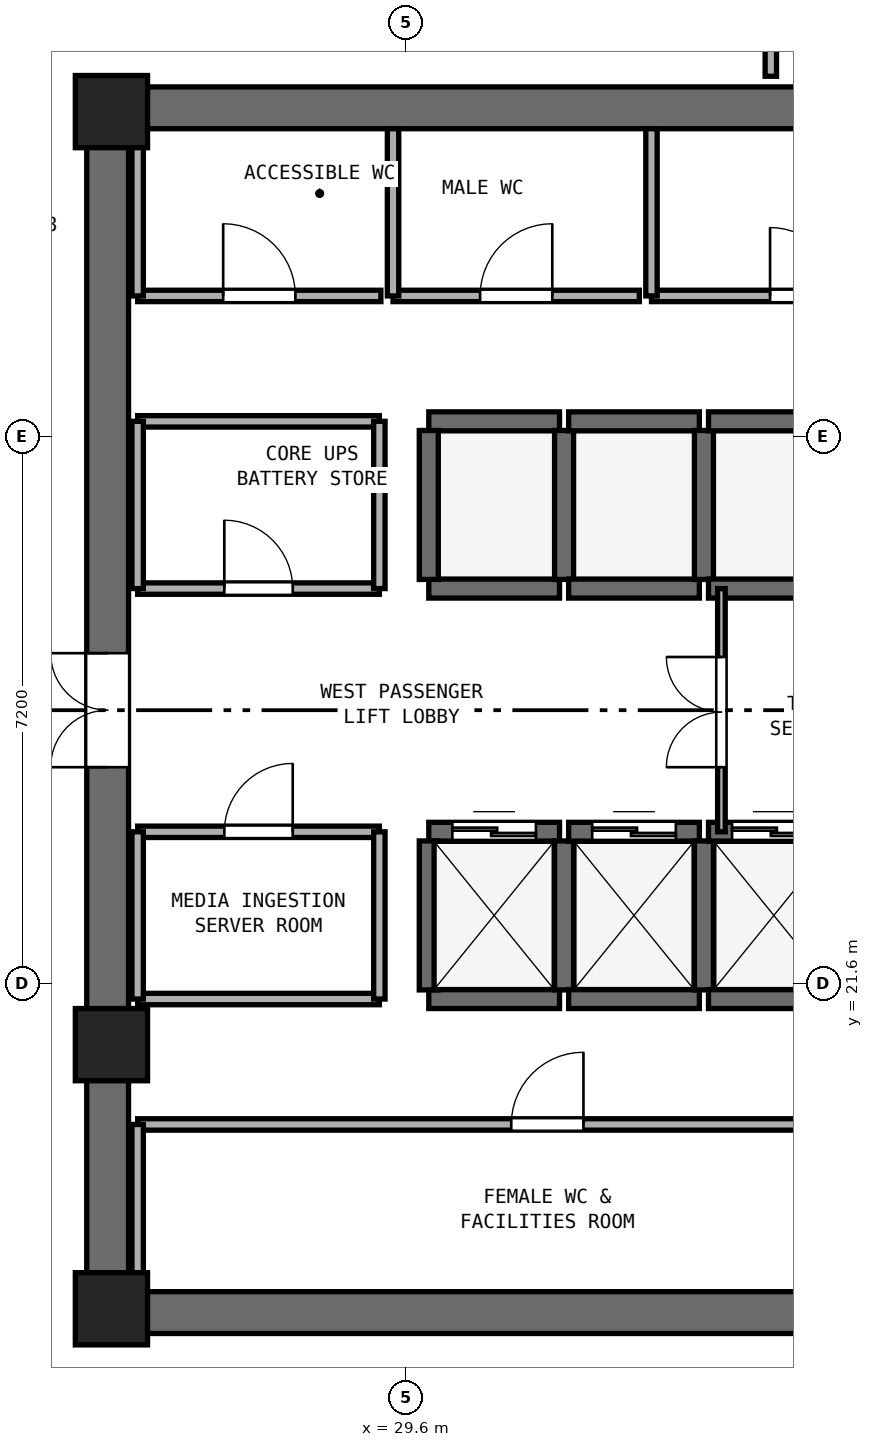
"""IFC4 building model, lengths in metres.
Left out: names, types, materials, properties, quantities, classifications, styles, units other than length and angle.
Written with IfcOpenShell. Run it as: python <this file> out.ifc"""

import sys

from ifc_helpers import new_model, si_unit, direction, frame, frame_2d, origin, origin_2d, place, context, subcontext, project, spatial, rectangle, extrude, element, fill, save


model = new_model("IFC4")
c1 = context("Model", 3, precision=1e-05, world=origin(), true_north=direction((0.0, 1.0)))
c2 = subcontext(c1, "Body", "Model", "MODEL_VIEW")
j1 = project(units=[si_unit("LENGTHUNIT", "METRE"), si_unit("PLANEANGLEUNIT", "RADIAN")], contexts=[c1])
p1 = place(None, origin())
s1 = spatial("IfcSite", under=j1, at=p1, CompositionType="ELEMENT")
p2 = place(p1, origin())
s2 = spatial("IfcBuilding", under=s1, at=p2, CompositionType="ELEMENT")
p3 = place(p2, frame((0.0, 0.0, 197.2)))
s3 = spatial("IfcBuildingStorey", under=s2, at=p3, CompositionType="ELEMENT", Elevation=197.2)
for number, where, z_axis, x_axis in (
    (1, (25.4, 17.275, 0.0), (0.0, 0.0, 1.0), (1.0, 0.0, 0.0)),
    (2, (25.4, 33.125, 0.0), (0.0, 0.0, 1.0), (1.0, 0.0, 0.0)),
):
    element("IfcWall", number, at=place(p3, frame(where, z_axis=z_axis, x_axis=x_axis)), inside=s3, PredefinedType="SHEAR", context=c2, shape_type="SweptSolid", body=[
        extrude(rectangle(XDim=23.2, YDim=0.55, at=frame_2d((11.6, 0.0))), origin(), (0.0, 0.0, 1.0), 3.54),
    ])
p4 = place(p3, frame((25.675, 17.55, 0.0), z_axis=(0.0, 0.0, 1.0), x_axis=(0.0, 1.0, 0.0)))
e3 = element("IfcWall", 3, at=p4, inside=s3, PredefinedType="SHEAR", context=c2, shape_type="SweptSolid", body=[
    extrude(rectangle(XDim=15.3, YDim=0.55, at=frame_2d((7.65, 0.0))), origin(), (0.0, 0.0, 1.0), 3.54),
])
p5 = place(p4, frame((6.9, 0.0, 0.0)))
e4 = element("IfcOpeningElement", 4, at=p5, cuts=e3, PredefinedType="OPENING", context=c2, shape_type="SweptSolid", body=[
    extrude(rectangle(XDim=1.5, YDim=2.15, at=frame_2d((0.75, 1.075))), frame((0.0, 0.285, 0.0), z_axis=(0.0, -1.0, 0.0), x_axis=(1.0, 0.0, 0.0)), (0.0, 0.0, 1.0), 0.57),
])
for number, where, z_axis, x_axis in (
    (5, (25.725, 17.325, 0.0), (0.0, 0.0, 1.0), (1.0, 0.0, 0.0)),
    (6, (25.725, 33.075, 0.0), (0.0, 0.0, 1.0), (1.0, 0.0, 0.0)),
    (7, (25.725, 20.8, 0.0), (0.0, 0.0, 1.0), (1.0, 0.0, 0.0)),
):
    element("IfcColumn", number, at=place(p3, frame(where, z_axis=z_axis, x_axis=x_axis)), inside=s3, PredefinedType="PILASTER", context=c2, shape_type="SweptSolid", body=[
        extrude(rectangle(XDim=0.95, YDim=0.95, at=origin_2d()), origin(), (0.0, 0.0, 1.0), 3.8),
    ])
p6 = place(p3, frame((29.9, 21.4, 0.0), z_axis=(0.0, 0.0, 1.0), x_axis=(1.0, 0.0, 0.0)))
e8 = element("IfcWall", 8, at=p6, inside=s3, PredefinedType="SHEAR", context=c2, shape_type="SweptSolid", body=[
    extrude(rectangle(XDim=1.72, YDim=0.25, at=frame_2d((0.86, 0.0))), origin(), (0.0, 0.0, 1.0), 3.54),
])
p7 = place(p3, frame((29.9, 23.6, 0.0), z_axis=(0.0, 0.0, 1.0), x_axis=(1.0, 0.0, 0.0)))
e9 = element("IfcWall", 9, at=p7, inside=s3, PredefinedType="SHEAR", context=c2, shape_type="SweptSolid", body=[
    extrude(rectangle(XDim=1.72, YDim=0.25, at=frame_2d((0.86, 0.0))), origin(), (0.0, 0.0, 1.0), 3.54),
])
p8 = place(p7, frame((0.31, 0.0, 0.0)))
e10 = element("IfcOpeningElement", 10, at=p8, cuts=e9, PredefinedType="OPENING", context=c2, shape_type="SweptSolid", body=[
    extrude(rectangle(XDim=1.1, YDim=2.15, at=frame_2d((0.55, 1.075))), frame((0.0, 0.135, 0.0), z_axis=(0.0, -1.0, 0.0), x_axis=(1.0, 0.0, 0.0)), (0.0, 0.0, 1.0), 0.27),
])
for number, where, z_axis, x_axis in (
    (11, (29.9, 21.52, 0.0), (0.0, 0.0, 1.0), (0.0, 1.0, 0.0)),
    (12, (31.68, 21.52, 0.0), (0.0, 0.0, 1.0), (0.0, 1.0, 0.0)),
):
    element("IfcWall", number, at=place(p3, frame(where, z_axis=z_axis, x_axis=x_axis)), inside=s3, PredefinedType="SHEAR", context=c2, shape_type="SweptSolid", body=[
        extrude(rectangle(XDim=1.96, YDim=0.25, at=frame_2d((0.98, 0.0))), origin(), (0.0, 0.0, 1.0), 3.54),
    ])
p9 = place(p3, frame((31.74, 21.4, 0.0), z_axis=(0.0, 0.0, 1.0), x_axis=(1.0, 0.0, 0.0)))
e13 = element("IfcWall", 13, at=p9, inside=s3, PredefinedType="SHEAR", context=c2, shape_type="SweptSolid", body=[
    extrude(rectangle(XDim=1.72, YDim=0.25, at=frame_2d((0.86, 0.0))), origin(), (0.0, 0.0, 1.0), 3.54),
])
p10 = place(p3, frame((31.74, 23.6, 0.0), z_axis=(0.0, 0.0, 1.0), x_axis=(1.0, 0.0, 0.0)))
e14 = element("IfcWall", 14, at=p10, inside=s3, PredefinedType="SHEAR", context=c2, shape_type="SweptSolid", body=[
    extrude(rectangle(XDim=1.72, YDim=0.25, at=frame_2d((0.86, 0.0))), origin(), (0.0, 0.0, 1.0), 3.54),
])
p11 = place(p10, frame((0.31, 0.0, 0.0)))
e15 = element("IfcOpeningElement", 15, at=p11, cuts=e14, PredefinedType="OPENING", context=c2, shape_type="SweptSolid", body=[
    extrude(rectangle(XDim=1.1, YDim=2.15, at=frame_2d((0.55, 1.075))), frame((0.0, 0.135, 0.0), z_axis=(0.0, -1.0, 0.0), x_axis=(1.0, 0.0, 0.0)), (0.0, 0.0, 1.0), 0.27),
])
p12 = place(p3, frame((33.52, 21.52, 0.0), z_axis=(0.0, 0.0, 1.0), x_axis=(0.0, 1.0, 0.0)))
e16 = element("IfcWall", 16, at=p12, inside=s3, PredefinedType="SHEAR", context=c2, shape_type="SweptSolid", body=[
    extrude(rectangle(XDim=1.96, YDim=0.25, at=frame_2d((0.98, 0.0))), origin(), (0.0, 0.0, 1.0), 3.54),
])
p13 = place(p3, frame((33.58, 21.4, 0.0), z_axis=(0.0, 0.0, 1.0), x_axis=(1.0, 0.0, 0.0)))
e17 = element("IfcWall", 17, at=p13, inside=s3, PredefinedType="SHEAR", context=c2, shape_type="SweptSolid", body=[
    extrude(rectangle(XDim=1.72, YDim=0.25, at=frame_2d((0.86, 0.0))), origin(), (0.0, 0.0, 1.0), 3.54),
])
p14 = place(p3, frame((33.58, 23.6, 0.0), z_axis=(0.0, 0.0, 1.0), x_axis=(1.0, 0.0, 0.0)))
e18 = element("IfcWall", 18, at=p14, inside=s3, PredefinedType="SHEAR", context=c2, shape_type="SweptSolid", body=[
    extrude(rectangle(XDim=1.72, YDim=0.25, at=frame_2d((0.86, 0.0))), origin(), (0.0, 0.0, 1.0), 3.54),
])
p15 = place(p14, frame((0.31, 0.0, 0.0)))
e19 = element("IfcOpeningElement", 19, at=p15, cuts=e18, PredefinedType="OPENING", context=c2, shape_type="SweptSolid", body=[
    extrude(rectangle(XDim=1.1, YDim=2.15, at=frame_2d((0.55, 1.075))), frame((0.0, 0.135, 0.0), z_axis=(0.0, -1.0, 0.0), x_axis=(1.0, 0.0, 0.0)), (0.0, 0.0, 1.0), 0.27),
])
for number, where, z_axis, x_axis in (
    (20, (29.9, 26.8, 0.0), (0.0, 0.0, 1.0), (1.0, 0.0, 0.0)),
    (21, (29.9, 29.0, 0.0), (0.0, 0.0, 1.0), (1.0, 0.0, 0.0)),
):
    element("IfcWall", number, at=place(p3, frame(where, z_axis=z_axis, x_axis=x_axis)), inside=s3, PredefinedType="SHEAR", context=c2, shape_type="SweptSolid", body=[
        extrude(rectangle(XDim=1.72, YDim=0.25, at=frame_2d((0.86, 0.0))), origin(), (0.0, 0.0, 1.0), 3.54),
    ])
for number, where, z_axis, x_axis in (
    (22, (29.9, 26.92, 0.0), (0.0, 0.0, 1.0), (0.0, 1.0, 0.0)),
    (23, (31.68, 26.92, 0.0), (0.0, 0.0, 1.0), (0.0, 1.0, 0.0)),
):
    element("IfcWall", number, at=place(p3, frame(where, z_axis=z_axis, x_axis=x_axis)), inside=s3, PredefinedType="SHEAR", context=c2, shape_type="SweptSolid", body=[
        extrude(rectangle(XDim=1.96, YDim=0.25, at=frame_2d((0.98, 0.0))), origin(), (0.0, 0.0, 1.0), 3.54),
    ])
for number, where, z_axis, x_axis in (
    (24, (31.74, 26.8, 0.0), (0.0, 0.0, 1.0), (1.0, 0.0, 0.0)),
    (25, (31.74, 29.0, 0.0), (0.0, 0.0, 1.0), (1.0, 0.0, 0.0)),
):
    element("IfcWall", number, at=place(p3, frame(where, z_axis=z_axis, x_axis=x_axis)), inside=s3, PredefinedType="SHEAR", context=c2, shape_type="SweptSolid", body=[
        extrude(rectangle(XDim=1.72, YDim=0.25, at=frame_2d((0.86, 0.0))), origin(), (0.0, 0.0, 1.0), 3.54),
    ])
p16 = place(p3, frame((33.52, 26.92, 0.0), z_axis=(0.0, 0.0, 1.0), x_axis=(0.0, 1.0, 0.0)))
e26 = element("IfcWall", 26, at=p16, inside=s3, PredefinedType="SHEAR", context=c2, shape_type="SweptSolid", body=[
    extrude(rectangle(XDim=1.96, YDim=0.25, at=frame_2d((0.98, 0.0))), origin(), (0.0, 0.0, 1.0), 3.54),
])
for number, where, z_axis, x_axis in (
    (27, (33.58, 26.8, 0.0), (0.0, 0.0, 1.0), (1.0, 0.0, 0.0)),
    (28, (33.58, 29.0, 0.0), (0.0, 0.0, 1.0), (1.0, 0.0, 0.0)),
):
    element("IfcWall", number, at=place(p3, frame(where, z_axis=z_axis, x_axis=x_axis)), inside=s3, PredefinedType="SHEAR", context=c2, shape_type="SweptSolid", body=[
        extrude(rectangle(XDim=1.72, YDim=0.25, at=frame_2d((0.86, 0.0))), origin(), (0.0, 0.0, 1.0), 3.54),
    ])
p17 = place(p3, frame((26.07, 30.65, 0.0), z_axis=(0.0, 0.0, 1.0), x_axis=(1.0, 0.0, 0.0)))
e29 = element("IfcWall", 29, at=p17, inside=s3, PredefinedType="PARTITIONING", context=c2, shape_type="SweptSolid", body=[
    extrude(rectangle(XDim=3.2, YDim=0.15, at=frame_2d((1.6, 0.0))), origin(), (0.0, 0.0, 1.0), 3.54),
])
p18 = place(p17, frame((1.125, 0.0, 0.0)))
e30 = element("IfcOpeningElement", 30, at=p18, cuts=e29, PredefinedType="OPENING", context=c2, shape_type="SweptSolid", body=[
    extrude(rectangle(XDim=0.95, YDim=2.1, at=frame_2d((0.475, 1.05))), frame((0.0, 0.085, 0.0), z_axis=(0.0, -1.0, 0.0), x_axis=(1.0, 0.0, 0.0)), (0.0, 0.0, 1.0), 0.17),
])
p19 = place(p3, frame((26.07, 30.65, 0.0), z_axis=(0.0, 0.0, 1.0), x_axis=(0.0, 1.0, 0.0)))
e31 = element("IfcWall", 31, at=p19, inside=s3, PredefinedType="PARTITIONING", context=c2, shape_type="SweptSolid", body=[
    extrude(rectangle(XDim=2.2, YDim=0.15, at=frame_2d((1.1, 0.0))), origin(), (0.0, 0.0, 1.0), 2.64),
])
p20 = place(p3, frame((29.43, 30.65, 0.0), z_axis=(0.0, 0.0, 1.0), x_axis=(1.0, 0.0, 0.0)))
e32 = element("IfcWall", 32, at=p20, inside=s3, PredefinedType="PARTITIONING", context=c2, shape_type="SweptSolid", body=[
    extrude(rectangle(XDim=3.24, YDim=0.15, at=frame_2d((1.62, 0.0))), origin(), (0.0, 0.0, 1.0), 3.54),
])
p21 = place(p20, frame((1.145, 0.0, 0.0)))
e33 = element("IfcOpeningElement", 33, at=p21, cuts=e32, PredefinedType="OPENING", context=c2, shape_type="SweptSolid", body=[
    extrude(rectangle(XDim=0.95, YDim=2.1, at=frame_2d((0.475, 1.05))), frame((0.0, 0.085, 0.0), z_axis=(0.0, -1.0, 0.0), x_axis=(1.0, 0.0, 0.0)), (0.0, 0.0, 1.0), 0.17),
])
p22 = place(p3, frame((29.43, 30.65, 0.0), z_axis=(0.0, 0.0, 1.0), x_axis=(0.0, 1.0, 0.0)))
e34 = element("IfcWall", 34, at=p22, inside=s3, PredefinedType="PARTITIONING", context=c2, shape_type="SweptSolid", body=[
    extrude(rectangle(XDim=2.2, YDim=0.15, at=frame_2d((1.1, 0.0))), origin(), (0.0, 0.0, 1.0), 3.54),
])
p23 = place(p3, frame((32.83, 30.65, 0.0), z_axis=(0.0, 0.0, 1.0), x_axis=(1.0, 0.0, 0.0)))
e35 = element("IfcWall", 35, at=p23, inside=s3, PredefinedType="PARTITIONING", context=c2, shape_type="SweptSolid", body=[
    extrude(rectangle(XDim=4.02, YDim=0.15, at=frame_2d((2.01, 0.0))), origin(), (0.0, 0.0, 1.0), 3.54),
])
p24 = place(p23, frame((1.56, 0.0, 0.0)))
e36 = element("IfcOpeningElement", 36, at=p24, cuts=e35, PredefinedType="OPENING", context=c2, shape_type="SweptSolid", body=[
    extrude(rectangle(XDim=0.9, YDim=2.1, at=frame_2d((0.45, 1.05))), frame((0.0, 0.085, 0.0), z_axis=(0.0, -1.0, 0.0), x_axis=(1.0, 0.0, 0.0)), (0.0, 0.0, 1.0), 0.17),
])
p25 = place(p3, frame((32.83, 30.65, 0.0), z_axis=(0.0, 0.0, 1.0), x_axis=(0.0, 1.0, 0.0)))
e37 = element("IfcWall", 37, at=p25, inside=s3, PredefinedType="PARTITIONING", context=c2, shape_type="SweptSolid", body=[
    extrude(rectangle(XDim=2.2, YDim=0.15, at=frame_2d((1.1, 0.0))), origin(), (0.0, 0.0, 1.0), 3.54),
])
p26 = place(p3, frame((26.07, 19.75, 0.0), z_axis=(0.0, 0.0, 1.0), x_axis=(1.0, 0.0, 0.0)))
e38 = element("IfcWall", 38, at=p26, inside=s3, PredefinedType="PARTITIONING", context=c2, shape_type="SweptSolid", body=[
    extrude(rectangle(XDim=10.78, YDim=0.15, at=frame_2d((5.39, 0.0))), origin(), (0.0, 0.0, 1.0), 3.54),
])
p27 = place(p26, frame((4.915, 0.0, 0.0)))
e39 = element("IfcOpeningElement", 39, at=p27, cuts=e38, PredefinedType="OPENING", context=c2, shape_type="SweptSolid", body=[
    extrude(rectangle(XDim=0.95, YDim=2.1, at=frame_2d((0.475, 1.05))), frame((0.0, 0.085, 0.0), z_axis=(0.0, -1.0, 0.0), x_axis=(1.0, 0.0, 0.0)), (0.0, 0.0, 1.0), 0.17),
])
p28 = place(p3, frame((26.07, 17.55, 0.0), z_axis=(0.0, 0.0, 1.0), x_axis=(0.0, 1.0, 0.0)))
e40 = element("IfcWall", 40, at=p28, inside=s3, PredefinedType="PARTITIONING", context=c2, shape_type="SweptSolid", body=[
    extrude(rectangle(XDim=2.2, YDim=0.15, at=frame_2d((1.1, 0.0))), origin(), (0.0, 0.0, 1.0), 2.64),
])
p29 = place(p3, frame((26.07, 26.8, 0.0), z_axis=(0.0, 0.0, 1.0), x_axis=(1.0, 0.0, 0.0)))
e41 = element("IfcWall", 41, at=p29, inside=s3, PredefinedType="PARTITIONING", context=c2, shape_type="SweptSolid", body=[
    extrude(rectangle(XDim=3.18, YDim=0.15, at=frame_2d((1.59, 0.0))), origin(), (0.0, 0.0, 1.0), 3.54),
])
p30 = place(p29, frame((1.14, 0.0, 0.0)))
e42 = element("IfcOpeningElement", 42, at=p30, cuts=e41, PredefinedType="OPENING", context=c2, shape_type="SweptSolid", body=[
    extrude(rectangle(XDim=0.9, YDim=2.1, at=frame_2d((0.45, 1.05))), frame((0.0, 0.085, 0.0), z_axis=(0.0, -1.0, 0.0), x_axis=(1.0, 0.0, 0.0)), (0.0, 0.0, 1.0), 0.17),
])
p31 = place(p3, frame((26.07, 29.0, 0.0), z_axis=(0.0, 0.0, 1.0), x_axis=(1.0, 0.0, 0.0)))
e43 = element("IfcWall", 43, at=p31, inside=s3, PredefinedType="PARTITIONING", context=c2, shape_type="SweptSolid", body=[
    extrude(rectangle(XDim=3.18, YDim=0.15, at=frame_2d((1.59, 0.0))), origin(), (0.0, 0.0, 1.0), 3.54),
])
p32 = place(p3, frame((26.07, 26.8, 0.0), z_axis=(0.0, 0.0, 1.0), x_axis=(0.0, 1.0, 0.0)))
e44 = element("IfcWall", 44, at=p32, inside=s3, PredefinedType="PARTITIONING", context=c2, shape_type="SweptSolid", body=[
    extrude(rectangle(XDim=2.2, YDim=0.15, at=frame_2d((1.1, 0.0))), origin(), (0.0, 0.0, 1.0), 2.64),
])
p33 = place(p3, frame((29.25, 26.8, 0.0), z_axis=(0.0, 0.0, 1.0), x_axis=(0.0, 1.0, 0.0)))
e45 = element("IfcWall", 45, at=p33, inside=s3, PredefinedType="PARTITIONING", context=c2, shape_type="SweptSolid", body=[
    extrude(rectangle(XDim=2.2, YDim=0.15, at=frame_2d((1.1, 0.0))), origin(), (0.0, 0.0, 1.0), 3.54),
])
p34 = place(p3, frame((26.07, 21.4, 0.0), z_axis=(0.0, 0.0, 1.0), x_axis=(1.0, 0.0, 0.0)))
e46 = element("IfcWall", 46, at=p34, inside=s3, PredefinedType="PARTITIONING", context=c2, shape_type="SweptSolid", body=[
    extrude(rectangle(XDim=3.18, YDim=0.15, at=frame_2d((1.59, 0.0))), origin(), (0.0, 0.0, 1.0), 3.54),
])
p35 = place(p3, frame((26.07, 23.6, 0.0), z_axis=(0.0, 0.0, 1.0), x_axis=(1.0, 0.0, 0.0)))
e47 = element("IfcWall", 47, at=p35, inside=s3, PredefinedType="PARTITIONING", context=c2, shape_type="SweptSolid", body=[
    extrude(rectangle(XDim=3.18, YDim=0.15, at=frame_2d((1.59, 0.0))), origin(), (0.0, 0.0, 1.0), 3.54),
])
p36 = place(p35, frame((1.14, 0.0, 0.0)))
e48 = element("IfcOpeningElement", 48, at=p36, cuts=e47, PredefinedType="OPENING", context=c2, shape_type="SweptSolid", body=[
    extrude(rectangle(XDim=0.9, YDim=2.1, at=frame_2d((0.45, 1.05))), frame((0.0, 0.085, 0.0), z_axis=(0.0, -1.0, 0.0), x_axis=(1.0, 0.0, 0.0)), (0.0, 0.0, 1.0), 0.17),
])
p37 = place(p3, frame((26.07, 21.4, 0.0), z_axis=(0.0, 0.0, 1.0), x_axis=(0.0, 1.0, 0.0)))
e49 = element("IfcWall", 49, at=p37, inside=s3, PredefinedType="PARTITIONING", context=c2, shape_type="SweptSolid", body=[
    extrude(rectangle(XDim=2.2, YDim=0.15, at=frame_2d((1.1, 0.0))), origin(), (0.0, 0.0, 1.0), 2.64),
])
p38 = place(p3, frame((29.25, 21.4, 0.0), z_axis=(0.0, 0.0, 1.0), x_axis=(0.0, 1.0, 0.0)))
e50 = element("IfcWall", 50, at=p38, inside=s3, PredefinedType="PARTITIONING", context=c2, shape_type="SweptSolid", body=[
    extrude(rectangle(XDim=2.2, YDim=0.15, at=frame_2d((1.1, 0.0))), origin(), (0.0, 0.0, 1.0), 3.54),
])
p39 = place(p3, frame((33.75, 23.6, 0.0), z_axis=(0.0, 0.0, 1.0), x_axis=(0.0, 1.0, 0.0)))
e51 = element("IfcWall", 51, at=p39, inside=s3, PredefinedType="PARTITIONING", context=c2, shape_type="SweptSolid", body=[
    extrude(rectangle(XDim=3.2, YDim=0.1, at=frame_2d((1.6, 0.0))), origin(), (0.0, 0.0, 1.0), 3.54),
])
p40 = place(p39, frame((0.85, 0.0, 0.0)))
e52 = element("IfcOpeningElement", 52, at=p40, cuts=e51, PredefinedType="OPENING", context=c2, shape_type="SweptSolid", body=[
    extrude(rectangle(XDim=1.45, YDim=2.12, at=frame_2d((0.725, 1.06))), frame((0.0, 0.06, 0.0), z_axis=(0.0, -1.0, 0.0), x_axis=(1.0, 0.0, 0.0)), (0.0, 0.0, 1.0), 0.12),
])
p41 = place(p3, frame((34.4, 33.54, 0.0), z_axis=(0.0, 0.0, 1.0), x_axis=(0.0, 1.0, 0.0)))
e53 = element("IfcWall", 53, at=p41, inside=s3, PredefinedType="PARTITIONING", context=c2, shape_type="SweptSolid", body=[
    extrude(rectangle(XDim=1.81, YDim=0.15, at=frame_2d((0.905, 0.0))), origin(), (0.0, 0.0, 1.0), 3.54),
])
p42 = place(p8, origin())
e54 = element("IfcDoor", 54, at=p42, inside=s3, OperationType="DOUBLE_DOOR_SLIDING", PredefinedType="DOOR", context=c2, shape_type="SweptSolid", body=[
    extrude(rectangle(XDim=1.1, YDim=2.15, at=frame_2d((0.55, 1.075))), frame((0.0, 0.025, 0.0), z_axis=(0.0, -1.0, 0.0), x_axis=(1.0, 0.0, 0.0)), (0.0, 0.0, 1.0), 0.05),
])
fill(e10, e54)
p43 = place(p11, origin())
e55 = element("IfcDoor", 55, at=p43, inside=s3, OperationType="DOUBLE_DOOR_SLIDING", PredefinedType="DOOR", context=c2, shape_type="SweptSolid", body=[
    extrude(rectangle(XDim=1.1, YDim=2.15, at=frame_2d((0.55, 1.075))), frame((0.0, 0.025, 0.0), z_axis=(0.0, -1.0, 0.0), x_axis=(1.0, 0.0, 0.0)), (0.0, 0.0, 1.0), 0.05),
])
fill(e15, e55)
p44 = place(p15, origin())
e56 = element("IfcDoor", 56, at=p44, inside=s3, OperationType="DOUBLE_DOOR_SLIDING", PredefinedType="DOOR", context=c2, shape_type="SweptSolid", body=[
    extrude(rectangle(XDim=1.1, YDim=2.15, at=frame_2d((0.55, 1.075))), frame((0.0, 0.025, 0.0), z_axis=(0.0, -1.0, 0.0), x_axis=(1.0, 0.0, 0.0)), (0.0, 0.0, 1.0), 0.05),
])
fill(e19, e56)
p45 = place(p5, origin())
e57 = element("IfcDoor", 57, at=p45, inside=s3, OperationType="DOUBLE_DOOR_SINGLE_SWING", PredefinedType="DOOR", context=c2, shape_type="SweptSolid", body=[
    extrude(rectangle(XDim=1.5, YDim=2.15, at=frame_2d((0.75, 1.075))), frame((0.0, 0.025, 0.0), z_axis=(0.0, -1.0, 0.0), x_axis=(1.0, 0.0, 0.0)), (0.0, 0.0, 1.0), 0.05),
])
fill(e4, e57)
p46 = place(p18, origin())
e58 = element("IfcDoor", 58, at=p46, inside=s3, OperationType="SINGLE_SWING_LEFT", PredefinedType="DOOR", context=c2, shape_type="SweptSolid", body=[
    extrude(rectangle(XDim=0.95, YDim=2.1, at=frame_2d((0.475, 1.05))), frame((0.0, 0.025, 0.0), z_axis=(0.0, -1.0, 0.0), x_axis=(1.0, 0.0, 0.0)), (0.0, 0.0, 1.0), 0.05),
])
fill(e30, e58)
p47 = place(p21, origin())
e59 = element("IfcDoor", 59, at=p47, inside=s3, OperationType="SINGLE_SWING_RIGHT", PredefinedType="DOOR", context=c2, shape_type="SweptSolid", body=[
    extrude(rectangle(XDim=0.95, YDim=2.1, at=frame_2d((0.475, 1.05))), frame((0.0, 0.025, 0.0), z_axis=(0.0, -1.0, 0.0), x_axis=(1.0, 0.0, 0.0)), (0.0, 0.0, 1.0), 0.05),
])
fill(e33, e59)
p48 = place(p24, origin())
e60 = element("IfcDoor", 60, at=p48, inside=s3, OperationType="SINGLE_SWING_LEFT", PredefinedType="DOOR", context=c2, shape_type="SweptSolid", body=[
    extrude(rectangle(XDim=0.9, YDim=2.1, at=frame_2d((0.45, 1.05))), frame((0.0, 0.025, 0.0), z_axis=(0.0, -1.0, 0.0), x_axis=(1.0, 0.0, 0.0)), (0.0, 0.0, 1.0), 0.05),
])
fill(e36, e60)
p49 = place(p27, origin())
e61 = element("IfcDoor", 61, at=p49, inside=s3, OperationType="SINGLE_SWING_RIGHT", PredefinedType="DOOR", context=c2, shape_type="SweptSolid", body=[
    extrude(rectangle(XDim=0.95, YDim=2.1, at=frame_2d((0.475, 1.05))), frame((0.0, 0.025, 0.0), z_axis=(0.0, -1.0, 0.0), x_axis=(1.0, 0.0, 0.0)), (0.0, 0.0, 1.0), 0.05),
])
fill(e39, e61)
p50 = place(p30, origin())
e62 = element("IfcDoor", 62, at=p50, inside=s3, OperationType="SINGLE_SWING_LEFT", PredefinedType="DOOR", context=c2, shape_type="SweptSolid", body=[
    extrude(rectangle(XDim=0.9, YDim=2.1, at=frame_2d((0.45, 1.05))), frame((0.0, 0.025, 0.0), z_axis=(0.0, -1.0, 0.0), x_axis=(1.0, 0.0, 0.0)), (0.0, 0.0, 1.0), 0.05),
])
fill(e42, e62)
p51 = place(p36, origin())
e63 = element("IfcDoor", 63, at=p51, inside=s3, OperationType="SINGLE_SWING_RIGHT", PredefinedType="DOOR", context=c2, shape_type="SweptSolid", body=[
    extrude(rectangle(XDim=0.9, YDim=2.1, at=frame_2d((0.45, 1.05))), frame((0.0, 0.025, 0.0), z_axis=(0.0, -1.0, 0.0), x_axis=(1.0, 0.0, 0.0)), (0.0, 0.0, 1.0), 0.05),
])
fill(e48, e63)
p52 = place(p40, origin())
e64 = element("IfcDoor", 64, at=p52, inside=s3, OperationType="DOUBLE_DOOR_SINGLE_SWING", PredefinedType="DOOR", context=c2, shape_type="SweptSolid", body=[
    extrude(rectangle(XDim=1.45, YDim=2.12, at=frame_2d((0.725, 1.06))), frame((0.0, 0.025, 0.0), z_axis=(0.0, -1.0, 0.0), x_axis=(1.0, 0.0, 0.0)), (0.0, 0.0, 1.0), 0.05),
])
fill(e52, e64)
save(model, sys.argv[1])
